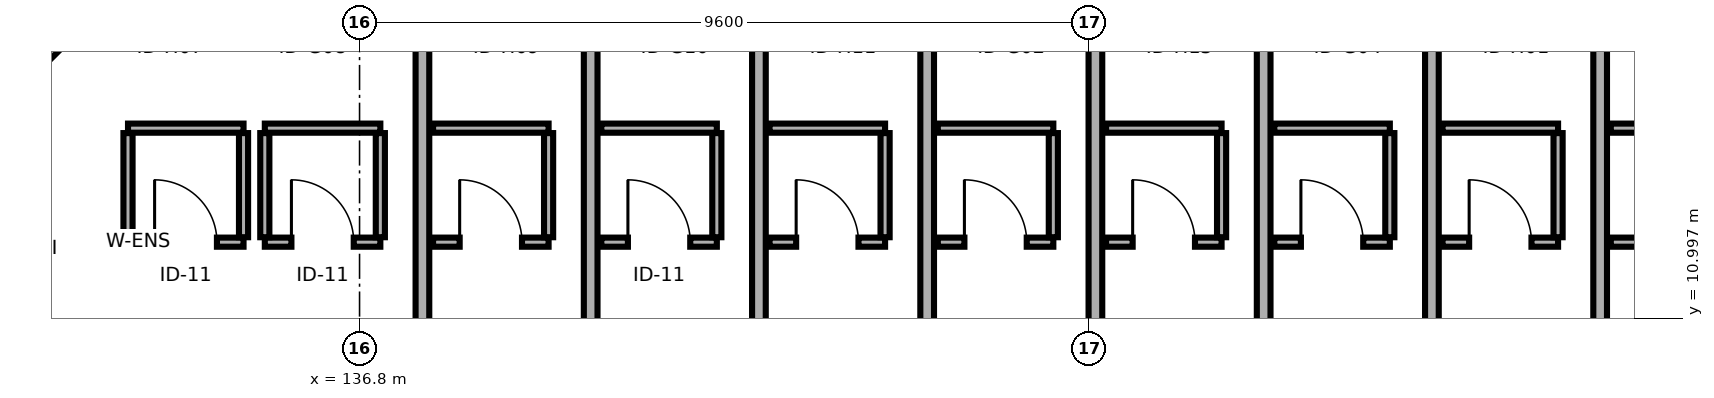
"""IFC4 building model, lengths in metres.
Left out: names, types, materials, properties, quantities, classifications, styles, units other than length and angle.
Written with IfcOpenShell. Run it as: python <this file> out.ifc"""

import sys

from ifc_helpers import new_model, si_unit, direction, frame, frame_2d, origin, place, context, subcontext, project, spatial, rectangle, extrude, element, fill, save


model = new_model("IFC4")
c1 = context("Model", 3, precision=1e-05, world=origin(), true_north=direction((0.0, 1.0)))
c2 = subcontext(c1, "Body", "Model", "MODEL_VIEW")
j1 = project(units=[si_unit("LENGTHUNIT", "METRE"), si_unit("PLANEANGLEUNIT", "RADIAN")], contexts=[c1])
p1 = place(None, origin())
s1 = spatial("IfcSite", under=j1, at=p1, CompositionType="ELEMENT")
p2 = place(p1, origin())
s2 = spatial("IfcBuilding", under=s1, at=p2, CompositionType="ELEMENT")
p3 = place(p2, frame((0.0, 0.0, 18.1)))
s3 = spatial("IfcBuildingStorey", under=s2, at=p3, CompositionType="ELEMENT", Elevation=18.1)
p4 = place(p3, frame((133.754, 12.0, 0.0), z_axis=(0.0, 0.0, 1.0), x_axis=(1.0, 0.0, 0.0)))
e1 = element("IfcWall", 1, at=p4, inside=s3, PredefinedType="PARTITIONING", context=c2, shape_type="SweptSolid", body=[
    extrude(rectangle(XDim=1.52, YDim=0.12, at=frame_2d((0.76, 0.0))), origin(), (0.0, 0.0, 1.0), 2.745),
])
p5 = place(p4, frame((0.35, 0.0, 0.0)))
e2 = element("IfcOpeningElement", 2, at=p5, cuts=e1, PredefinedType="OPENING", context=c2, shape_type="SweptSolid", body=[
    extrude(rectangle(XDim=0.82, YDim=2.08, at=frame_2d((0.41, 1.04))), frame((0.0, 0.07, 0.0), z_axis=(0.0, -1.0, 0.0), x_axis=(1.0, 0.0, 0.0)), (0.0, 0.0, 1.0), 0.14),
])
p6 = place(p3, frame((133.754, 13.5, 0.0), z_axis=(0.0, 0.0, 1.0), x_axis=(1.0, 0.0, 0.0)))
e3 = element("IfcWall", 3, at=p6, inside=s3, PredefinedType="PARTITIONING", context=c2, shape_type="SweptSolid", body=[
    extrude(rectangle(XDim=1.52, YDim=0.12, at=frame_2d((0.76, 0.0))), origin(), (0.0, 0.0, 1.0), 3.21),
])
p7 = place(p3, frame((133.754, 12.065, 0.0), z_axis=(0.0, 0.0, 1.0), x_axis=(0.0, 1.0, 0.0)))
e4 = element("IfcWall", 4, at=p7, inside=s3, PredefinedType="PARTITIONING", context=c2, shape_type="SweptSolid", body=[
    extrude(rectangle(XDim=1.37, YDim=0.12, at=frame_2d((0.685, 0.0))), origin(), (0.0, 0.0, 1.0), 3.21),
])
p8 = place(p3, frame((135.274, 12.065, 0.0), z_axis=(0.0, 0.0, 1.0), x_axis=(0.0, 1.0, 0.0)))
e5 = element("IfcWall", 5, at=p8, inside=s3, PredefinedType="PARTITIONING", context=c2, shape_type="SweptSolid", body=[
    extrude(rectangle(XDim=1.37, YDim=0.12, at=frame_2d((0.685, 0.0))), origin(), (0.0, 0.0, 1.0), 2.745),
])
p9 = place(p3, frame((133.2, 15.0, 0.0), z_axis=(0.0, 0.0, 1.0), x_axis=(-0.707106781187, -0.707106781187, 0.0)))
e6 = element("IfcWall", 6, at=p9, inside=s3, PredefinedType="PARTITIONING", context=c2, shape_type="SweptSolid", body=[
    extrude(rectangle(XDim=4.839, YDim=0.18, at=frame_2d((2.419, 0.0))), origin(), (0.0, 0.0, 1.0), 2.755),
])
p10 = place(p3, frame((135.554, 12.0, 0.0), z_axis=(0.0, 0.0, 1.0), x_axis=(1.0, 0.0, 0.0)))
e7 = element("IfcWall", 7, at=p10, inside=s3, PredefinedType="PARTITIONING", context=c2, shape_type="SweptSolid", body=[
    extrude(rectangle(XDim=1.52, YDim=0.12, at=frame_2d((0.76, 0.0))), origin(), (0.0, 0.0, 1.0), 3.21),
])
p11 = place(p10, frame((0.35, 0.0, 0.0)))
e8 = element("IfcOpeningElement", 8, at=p11, cuts=e7, PredefinedType="OPENING", context=c2, shape_type="SweptSolid", body=[
    extrude(rectangle(XDim=0.82, YDim=2.08, at=frame_2d((0.41, 1.04))), frame((0.0, 0.07, 0.0), z_axis=(0.0, -1.0, 0.0), x_axis=(1.0, 0.0, 0.0)), (0.0, 0.0, 1.0), 0.14),
])
p12 = place(p3, frame((135.554, 13.5, 0.0), z_axis=(0.0, 0.0, 1.0), x_axis=(1.0, 0.0, 0.0)))
e9 = element("IfcWall", 9, at=p12, inside=s3, PredefinedType="PARTITIONING", context=c2, shape_type="SweptSolid", body=[
    extrude(rectangle(XDim=1.52, YDim=0.12, at=frame_2d((0.76, 0.0))), origin(), (0.0, 0.0, 1.0), 2.745),
])
p13 = place(p3, frame((135.554, 12.065, 0.0), z_axis=(0.0, 0.0, 1.0), x_axis=(0.0, 1.0, 0.0)))
e10 = element("IfcWall", 10, at=p13, inside=s3, PredefinedType="PARTITIONING", context=c2, shape_type="SweptSolid", body=[
    extrude(rectangle(XDim=1.37, YDim=0.12, at=frame_2d((0.685, 0.0))), origin(), (0.0, 0.0, 1.0), 2.745),
])
p14 = place(p3, frame((137.073, 12.065, 0.0), z_axis=(0.0, 0.0, 1.0), x_axis=(0.0, 1.0, 0.0)))
e11 = element("IfcWall", 11, at=p14, inside=s3, PredefinedType="PARTITIONING", context=c2, shape_type="SweptSolid", body=[
    extrude(rectangle(XDim=1.37, YDim=0.12, at=frame_2d((0.685, 0.0))), origin(), (0.0, 0.0, 1.0), 3.21),
])
p15 = place(p3, frame((137.627, 7.246, 0.0), z_axis=(0.0, 0.0, 1.0), x_axis=(0.0, 1.0, 0.0)))
e12 = element("IfcWall", 12, at=p15, inside=s3, PredefinedType="PARTITIONING", context=c2, shape_type="SweptSolid", body=[
    extrude(rectangle(XDim=7.754, YDim=0.18, at=frame_2d((3.877, 0.0))), origin(), (0.0, 0.0, 1.0), 2.755),
])
p16 = place(p3, frame((137.767, 12.0, 0.0), z_axis=(0.0, 0.0, 1.0), x_axis=(1.0, 0.0, 0.0)))
e13 = element("IfcWall", 13, at=p16, inside=s3, PredefinedType="PARTITIONING", context=c2, shape_type="SweptSolid", body=[
    extrude(rectangle(XDim=1.52, YDim=0.12, at=frame_2d((0.76, 0.0))), origin(), (0.0, 0.0, 1.0), 3.21),
])
p17 = place(p16, frame((0.35, 0.0, 0.0)))
e14 = element("IfcOpeningElement", 14, at=p17, cuts=e13, PredefinedType="OPENING", context=c2, shape_type="SweptSolid", body=[
    extrude(rectangle(XDim=0.82, YDim=2.08, at=frame_2d((0.41, 1.04))), frame((0.0, 0.07, 0.0), z_axis=(0.0, -1.0, 0.0), x_axis=(1.0, 0.0, 0.0)), (0.0, 0.0, 1.0), 0.14),
])
p18 = place(p3, frame((137.767, 13.5, 0.0), z_axis=(0.0, 0.0, 1.0), x_axis=(1.0, 0.0, 0.0)))
e15 = element("IfcWall", 15, at=p18, inside=s3, PredefinedType="PARTITIONING", context=c2, shape_type="SweptSolid", body=[
    extrude(rectangle(XDim=1.52, YDim=0.12, at=frame_2d((0.76, 0.0))), origin(), (0.0, 0.0, 1.0), 3.21),
])
p19 = place(p3, frame((139.287, 12.065, 0.0), z_axis=(0.0, 0.0, 1.0), x_axis=(0.0, 1.0, 0.0)))
e16 = element("IfcWall", 16, at=p19, inside=s3, PredefinedType="PARTITIONING", context=c2, shape_type="SweptSolid", body=[
    extrude(rectangle(XDim=1.37, YDim=0.12, at=frame_2d((0.685, 0.0))), origin(), (0.0, 0.0, 1.0), 3.21),
])
p20 = place(p3, frame((139.841, 6.823, 0.0), z_axis=(0.0, 0.0, 1.0), x_axis=(0.0, 1.0, 0.0)))
e17 = element("IfcWall", 17, at=p20, inside=s3, PredefinedType="PARTITIONING", context=c2, shape_type="SweptSolid", body=[
    extrude(rectangle(XDim=8.177, YDim=0.18, at=frame_2d((4.089, 0.0))), origin(), (0.0, 0.0, 1.0), 2.755),
])
p21 = place(p3, frame((139.981, 12.0, 0.0), z_axis=(0.0, 0.0, 1.0), x_axis=(1.0, 0.0, 0.0)))
e18 = element("IfcWall", 18, at=p21, inside=s3, PredefinedType="PARTITIONING", context=c2, shape_type="SweptSolid", body=[
    extrude(rectangle(XDim=1.52, YDim=0.12, at=frame_2d((0.76, 0.0))), origin(), (0.0, 0.0, 1.0), 2.745),
])
p22 = place(p21, frame((0.35, 0.0, 0.0)))
e19 = element("IfcOpeningElement", 19, at=p22, cuts=e18, PredefinedType="OPENING", context=c2, shape_type="SweptSolid", body=[
    extrude(rectangle(XDim=0.82, YDim=2.08, at=frame_2d((0.41, 1.04))), frame((0.0, 0.07, 0.0), z_axis=(0.0, -1.0, 0.0), x_axis=(1.0, 0.0, 0.0)), (0.0, 0.0, 1.0), 0.14),
])
p23 = place(p3, frame((139.981, 13.5, 0.0), z_axis=(0.0, 0.0, 1.0), x_axis=(1.0, 0.0, 0.0)))
e20 = element("IfcWall", 20, at=p23, inside=s3, PredefinedType="PARTITIONING", context=c2, shape_type="SweptSolid", body=[
    extrude(rectangle(XDim=1.52, YDim=0.12, at=frame_2d((0.76, 0.0))), origin(), (0.0, 0.0, 1.0), 2.745),
])
p24 = place(p3, frame((141.501, 12.065, 0.0), z_axis=(0.0, 0.0, 1.0), x_axis=(0.0, 1.0, 0.0)))
e21 = element("IfcWall", 21, at=p24, inside=s3, PredefinedType="PARTITIONING", context=c2, shape_type="SweptSolid", body=[
    extrude(rectangle(XDim=1.37, YDim=0.12, at=frame_2d((0.685, 0.0))), origin(), (0.0, 0.0, 1.0), 2.745),
])
p25 = place(p3, frame((142.054, 6.605, 0.0), z_axis=(0.0, 0.0, 1.0), x_axis=(0.0, 1.0, 0.0)))
e22 = element("IfcWall", 22, at=p25, inside=s3, PredefinedType="PARTITIONING", context=c2, shape_type="SweptSolid", body=[
    extrude(rectangle(XDim=8.395, YDim=0.18, at=frame_2d((4.198, 0.0))), origin(), (0.0, 0.0, 1.0), 2.755),
])
p26 = place(p3, frame((142.195, 12.0, 0.0), z_axis=(0.0, 0.0, 1.0), x_axis=(1.0, 0.0, 0.0)))
e23 = element("IfcWall", 23, at=p26, inside=s3, PredefinedType="PARTITIONING", context=c2, shape_type="SweptSolid", body=[
    extrude(rectangle(XDim=1.52, YDim=0.12, at=frame_2d((0.76, 0.0))), origin(), (0.0, 0.0, 1.0), 3.21),
])
p27 = place(p26, frame((0.35, 0.0, 0.0)))
e24 = element("IfcOpeningElement", 24, at=p27, cuts=e23, PredefinedType="OPENING", context=c2, shape_type="SweptSolid", body=[
    extrude(rectangle(XDim=0.82, YDim=2.08, at=frame_2d((0.41, 1.04))), frame((0.0, 0.07, 0.0), z_axis=(0.0, -1.0, 0.0), x_axis=(1.0, 0.0, 0.0)), (0.0, 0.0, 1.0), 0.14),
])
p28 = place(p3, frame((142.195, 13.5, 0.0), z_axis=(0.0, 0.0, 1.0), x_axis=(1.0, 0.0, 0.0)))
e25 = element("IfcWall", 25, at=p28, inside=s3, PredefinedType="PARTITIONING", context=c2, shape_type="SweptSolid", body=[
    extrude(rectangle(XDim=1.52, YDim=0.12, at=frame_2d((0.76, 0.0))), origin(), (0.0, 0.0, 1.0), 3.21),
])
p29 = place(p3, frame((143.715, 12.065, 0.0), z_axis=(0.0, 0.0, 1.0), x_axis=(0.0, 1.0, 0.0)))
e26 = element("IfcWall", 26, at=p29, inside=s3, PredefinedType="PARTITIONING", context=c2, shape_type="SweptSolid", body=[
    extrude(rectangle(XDim=1.37, YDim=0.12, at=frame_2d((0.685, 0.0))), origin(), (0.0, 0.0, 1.0), 3.21),
])
p30 = place(p3, frame((144.268, 6.597, 0.0), z_axis=(0.0, 0.0, 1.0), x_axis=(0.0, 1.0, 0.0)))
e27 = element("IfcWall", 27, at=p30, inside=s3, PredefinedType="PARTITIONING", context=c2, shape_type="SweptSolid", body=[
    extrude(rectangle(XDim=8.403, YDim=0.18, at=frame_2d((4.201, 0.0))), origin(), (0.0, 0.0, 1.0), 2.755),
])
p31 = place(p3, frame((144.408, 12.0, 0.0), z_axis=(0.0, 0.0, 1.0), x_axis=(1.0, 0.0, 0.0)))
e28 = element("IfcWall", 28, at=p31, inside=s3, PredefinedType="PARTITIONING", context=c2, shape_type="SweptSolid", body=[
    extrude(rectangle(XDim=1.52, YDim=0.12, at=frame_2d((0.76, 0.0))), origin(), (0.0, 0.0, 1.0), 3.21),
])
p32 = place(p31, frame((0.35, 0.0, 0.0)))
e29 = element("IfcOpeningElement", 29, at=p32, cuts=e28, PredefinedType="OPENING", context=c2, shape_type="SweptSolid", body=[
    extrude(rectangle(XDim=0.82, YDim=2.08, at=frame_2d((0.41, 1.04))), frame((0.0, 0.07, 0.0), z_axis=(0.0, -1.0, 0.0), x_axis=(1.0, 0.0, 0.0)), (0.0, 0.0, 1.0), 0.14),
])
p33 = place(p3, frame((144.408, 13.5, 0.0), z_axis=(0.0, 0.0, 1.0), x_axis=(1.0, 0.0, 0.0)))
e30 = element("IfcWall", 30, at=p33, inside=s3, PredefinedType="PARTITIONING", context=c2, shape_type="SweptSolid", body=[
    extrude(rectangle(XDim=1.52, YDim=0.12, at=frame_2d((0.76, 0.0))), origin(), (0.0, 0.0, 1.0), 3.21),
])
p34 = place(p3, frame((145.928, 12.065, 0.0), z_axis=(0.0, 0.0, 1.0), x_axis=(0.0, 1.0, 0.0)))
e31 = element("IfcWall", 31, at=p34, inside=s3, PredefinedType="PARTITIONING", context=c2, shape_type="SweptSolid", body=[
    extrude(rectangle(XDim=1.37, YDim=0.12, at=frame_2d((0.685, 0.0))), origin(), (0.0, 0.0, 1.0), 3.21),
])
p35 = place(p3, frame((146.482, 6.597, 0.0), z_axis=(0.0, 0.0, 1.0), x_axis=(0.0, 1.0, 0.0)))
e32 = element("IfcWall", 32, at=p35, inside=s3, PredefinedType="PARTITIONING", context=c2, shape_type="SweptSolid", body=[
    extrude(rectangle(XDim=8.403, YDim=0.18, at=frame_2d((4.201, 0.0))), origin(), (0.0, 0.0, 1.0), 2.755),
])
p36 = place(p3, frame((146.622, 12.0, 0.0), z_axis=(0.0, 0.0, 1.0), x_axis=(1.0, 0.0, 0.0)))
e33 = element("IfcWall", 33, at=p36, inside=s3, PredefinedType="PARTITIONING", context=c2, shape_type="SweptSolid", body=[
    extrude(rectangle(XDim=1.52, YDim=0.12, at=frame_2d((0.76, 0.0))), origin(), (0.0, 0.0, 1.0), 3.21),
])
p37 = place(p36, frame((0.35, 0.0, 0.0)))
e34 = element("IfcOpeningElement", 34, at=p37, cuts=e33, PredefinedType="OPENING", context=c2, shape_type="SweptSolid", body=[
    extrude(rectangle(XDim=0.82, YDim=2.08, at=frame_2d((0.41, 1.04))), frame((0.0, 0.07, 0.0), z_axis=(0.0, -1.0, 0.0), x_axis=(1.0, 0.0, 0.0)), (0.0, 0.0, 1.0), 0.14),
])
p38 = place(p3, frame((146.622, 13.5, 0.0), z_axis=(0.0, 0.0, 1.0), x_axis=(1.0, 0.0, 0.0)))
e35 = element("IfcWall", 35, at=p38, inside=s3, PredefinedType="PARTITIONING", context=c2, shape_type="SweptSolid", body=[
    extrude(rectangle(XDim=1.52, YDim=0.12, at=frame_2d((0.76, 0.0))), origin(), (0.0, 0.0, 1.0), 3.21),
])
p39 = place(p3, frame((148.142, 12.065, 0.0), z_axis=(0.0, 0.0, 1.0), x_axis=(0.0, 1.0, 0.0)))
e36 = element("IfcWall", 36, at=p39, inside=s3, PredefinedType="PARTITIONING", context=c2, shape_type="SweptSolid", body=[
    extrude(rectangle(XDim=1.37, YDim=0.12, at=frame_2d((0.685, 0.0))), origin(), (0.0, 0.0, 1.0), 3.21),
])
p40 = place(p3, frame((148.696, 6.639, 0.0), z_axis=(0.0, 0.0, 1.0), x_axis=(0.0, 1.0, 0.0)))
e37 = element("IfcWall", 37, at=p40, inside=s3, PredefinedType="PARTITIONING", context=c2, shape_type="SweptSolid", body=[
    extrude(rectangle(XDim=8.361, YDim=0.18, at=frame_2d((4.18, 0.0))), origin(), (0.0, 0.0, 1.0), 2.755),
])
p41 = place(p3, frame((148.835, 12.0, 0.0), z_axis=(0.0, 0.0, 1.0), x_axis=(1.0, 0.0, 0.0)))
e38 = element("IfcWall", 38, at=p41, inside=s3, PredefinedType="PARTITIONING", context=c2, shape_type="SweptSolid", body=[
    extrude(rectangle(XDim=1.52, YDim=0.12, at=frame_2d((0.76, 0.0))), origin(), (0.0, 0.0, 1.0), 2.745),
])
p42 = place(p41, frame((0.35, 0.0, 0.0)))
e39 = element("IfcOpeningElement", 39, at=p42, cuts=e38, PredefinedType="OPENING", context=c2, shape_type="SweptSolid", body=[
    extrude(rectangle(XDim=0.82, YDim=2.08, at=frame_2d((0.41, 1.04))), frame((0.0, 0.07, 0.0), z_axis=(0.0, -1.0, 0.0), x_axis=(1.0, 0.0, 0.0)), (0.0, 0.0, 1.0), 0.14),
])
p43 = place(p3, frame((148.835, 13.5, 0.0), z_axis=(0.0, 0.0, 1.0), x_axis=(1.0, 0.0, 0.0)))
e40 = element("IfcWall", 40, at=p43, inside=s3, PredefinedType="PARTITIONING", context=c2, shape_type="SweptSolid", body=[
    extrude(rectangle(XDim=1.52, YDim=0.12, at=frame_2d((0.76, 0.0))), origin(), (0.0, 0.0, 1.0), 2.745),
])
p44 = place(p3, frame((150.355, 12.065, 0.0), z_axis=(0.0, 0.0, 1.0), x_axis=(0.0, 1.0, 0.0)))
e41 = element("IfcWall", 41, at=p44, inside=s3, PredefinedType="PARTITIONING", context=c2, shape_type="SweptSolid", body=[
    extrude(rectangle(XDim=1.37, YDim=0.12, at=frame_2d((0.685, 0.0))), origin(), (0.0, 0.0, 1.0), 3.21),
])
p45 = place(p3, frame((150.909, 6.857, 0.0), z_axis=(0.0, 0.0, 1.0), x_axis=(0.0, 1.0, 0.0)))
e42 = element("IfcWall", 42, at=p45, inside=s3, PredefinedType="PARTITIONING", context=c2, shape_type="SweptSolid", body=[
    extrude(rectangle(XDim=8.143, YDim=0.18, at=frame_2d((4.071, 0.0))), origin(), (0.0, 0.0, 1.0), 2.755),
])
p46 = place(p3, frame((151.049, 12.0, 0.0), z_axis=(0.0, 0.0, 1.0), x_axis=(1.0, 0.0, 0.0)))
e43 = element("IfcWall", 43, at=p46, inside=s3, PredefinedType="PARTITIONING", context=c2, shape_type="SweptSolid", body=[
    extrude(rectangle(XDim=1.52, YDim=0.12, at=frame_2d((0.76, 0.0))), origin(), (0.0, 0.0, 1.0), 3.21),
])
p47 = place(p46, frame((0.35, 0.0, 0.0)))
e44 = element("IfcOpeningElement", 44, at=p47, cuts=e43, PredefinedType="OPENING", context=c2, shape_type="SweptSolid", body=[
    extrude(rectangle(XDim=0.82, YDim=2.08, at=frame_2d((0.41, 1.04))), frame((0.0, 0.07, 0.0), z_axis=(0.0, -1.0, 0.0), x_axis=(1.0, 0.0, 0.0)), (0.0, 0.0, 1.0), 0.14),
])
p48 = place(p3, frame((151.049, 13.5, 0.0), z_axis=(0.0, 0.0, 1.0), x_axis=(1.0, 0.0, 0.0)))
e45 = element("IfcWall", 45, at=p48, inside=s3, PredefinedType="PARTITIONING", context=c2, shape_type="SweptSolid", body=[
    extrude(rectangle(XDim=1.52, YDim=0.12, at=frame_2d((0.76, 0.0))), origin(), (0.0, 0.0, 1.0), 3.21),
])
p49 = place(p3, frame((152.569, 12.065, 0.0), z_axis=(0.0, 0.0, 1.0), x_axis=(0.0, 1.0, 0.0)))
e46 = element("IfcWall", 46, at=p49, inside=s3, PredefinedType="PARTITIONING", context=c2, shape_type="SweptSolid", body=[
    extrude(rectangle(XDim=1.37, YDim=0.12, at=frame_2d((0.685, 0.0))), origin(), (0.0, 0.0, 1.0), 3.21),
])
p50 = place(p3, frame((153.123, 7.352, 0.0), z_axis=(0.0, 0.0, 1.0), x_axis=(0.0, 1.0, 0.0)))
e47 = element("IfcWall", 47, at=p50, inside=s3, PredefinedType="PARTITIONING", context=c2, shape_type="SweptSolid", body=[
    extrude(rectangle(XDim=7.648, YDim=0.18, at=frame_2d((3.824, 0.0))), origin(), (0.0, 0.0, 1.0), 2.755),
])
p51 = place(p3, frame((153.263, 12.0, 0.0), z_axis=(0.0, 0.0, 1.0), x_axis=(1.0, 0.0, 0.0)))
e48 = element("IfcWall", 48, at=p51, inside=s3, PredefinedType="PARTITIONING", context=c2, shape_type="SweptSolid", body=[
    extrude(rectangle(XDim=1.52, YDim=0.12, at=frame_2d((0.76, 0.0))), origin(), (0.0, 0.0, 1.0), 3.21),
])
p52 = place(p51, frame((0.35, 0.0, 0.0)))
e49 = element("IfcOpeningElement", 49, at=p52, cuts=e48, PredefinedType="OPENING", context=c2, shape_type="SweptSolid", body=[
    extrude(rectangle(XDim=0.82, YDim=2.08, at=frame_2d((0.41, 1.04))), frame((0.0, 0.07, 0.0), z_axis=(0.0, -1.0, 0.0), x_axis=(1.0, 0.0, 0.0)), (0.0, 0.0, 1.0), 0.14),
])
p53 = place(p3, frame((153.263, 13.5, 0.0), z_axis=(0.0, 0.0, 1.0), x_axis=(1.0, 0.0, 0.0)))
e50 = element("IfcWall", 50, at=p53, inside=s3, PredefinedType="PARTITIONING", context=c2, shape_type="SweptSolid", body=[
    extrude(rectangle(XDim=1.52, YDim=0.12, at=frame_2d((0.76, 0.0))), origin(), (0.0, 0.0, 1.0), 3.21),
])
p54 = place(p5, origin())
e51 = element("IfcDoor", 51, at=p54, inside=s3, OperationType="SINGLE_SWING_LEFT", PredefinedType="DOOR", context=c2, shape_type="SweptSolid", body=[
    extrude(rectangle(XDim=0.82, YDim=2.08, at=frame_2d((0.41, 1.04))), frame((0.0, 0.025, 0.0), z_axis=(0.0, -1.0, 0.0), x_axis=(1.0, 0.0, 0.0)), (0.0, 0.0, 1.0), 0.05),
])
fill(e2, e51)
p55 = place(p11, origin())
e52 = element("IfcDoor", 52, at=p55, inside=s3, OperationType="SINGLE_SWING_LEFT", PredefinedType="DOOR", context=c2, shape_type="SweptSolid", body=[
    extrude(rectangle(XDim=0.82, YDim=2.08, at=frame_2d((0.41, 1.04))), frame((0.0, 0.025, 0.0), z_axis=(0.0, -1.0, 0.0), x_axis=(1.0, 0.0, 0.0)), (0.0, 0.0, 1.0), 0.05),
])
fill(e8, e52)
p56 = place(p17, origin())
e53 = element("IfcDoor", 53, at=p56, inside=s3, OperationType="SINGLE_SWING_LEFT", PredefinedType="DOOR", context=c2, shape_type="SweptSolid", body=[
    extrude(rectangle(XDim=0.82, YDim=2.08, at=frame_2d((0.41, 1.04))), frame((0.0, 0.025, 0.0), z_axis=(0.0, -1.0, 0.0), x_axis=(1.0, 0.0, 0.0)), (0.0, 0.0, 1.0), 0.05),
])
fill(e14, e53)
p57 = place(p22, origin())
e54 = element("IfcDoor", 54, at=p57, inside=s3, OperationType="SINGLE_SWING_LEFT", PredefinedType="DOOR", context=c2, shape_type="SweptSolid", body=[
    extrude(rectangle(XDim=0.82, YDim=2.08, at=frame_2d((0.41, 1.04))), frame((0.0, 0.025, 0.0), z_axis=(0.0, -1.0, 0.0), x_axis=(1.0, 0.0, 0.0)), (0.0, 0.0, 1.0), 0.05),
])
fill(e19, e54)
p58 = place(p27, origin())
e55 = element("IfcDoor", 55, at=p58, inside=s3, OperationType="SINGLE_SWING_LEFT", PredefinedType="DOOR", context=c2, shape_type="SweptSolid", body=[
    extrude(rectangle(XDim=0.82, YDim=2.08, at=frame_2d((0.41, 1.04))), frame((0.0, 0.025, 0.0), z_axis=(0.0, -1.0, 0.0), x_axis=(1.0, 0.0, 0.0)), (0.0, 0.0, 1.0), 0.05),
])
fill(e24, e55)
p59 = place(p32, origin())
e56 = element("IfcDoor", 56, at=p59, inside=s3, OperationType="SINGLE_SWING_LEFT", PredefinedType="DOOR", context=c2, shape_type="SweptSolid", body=[
    extrude(rectangle(XDim=0.82, YDim=2.08, at=frame_2d((0.41, 1.04))), frame((0.0, 0.025, 0.0), z_axis=(0.0, -1.0, 0.0), x_axis=(1.0, 0.0, 0.0)), (0.0, 0.0, 1.0), 0.05),
])
fill(e29, e56)
p60 = place(p37, origin())
e57 = element("IfcDoor", 57, at=p60, inside=s3, OperationType="SINGLE_SWING_LEFT", PredefinedType="DOOR", context=c2, shape_type="SweptSolid", body=[
    extrude(rectangle(XDim=0.82, YDim=2.08, at=frame_2d((0.41, 1.04))), frame((0.0, 0.025, 0.0), z_axis=(0.0, -1.0, 0.0), x_axis=(1.0, 0.0, 0.0)), (0.0, 0.0, 1.0), 0.05),
])
fill(e34, e57)
p61 = place(p42, origin())
e58 = element("IfcDoor", 58, at=p61, inside=s3, OperationType="SINGLE_SWING_LEFT", PredefinedType="DOOR", context=c2, shape_type="SweptSolid", body=[
    extrude(rectangle(XDim=0.82, YDim=2.08, at=frame_2d((0.41, 1.04))), frame((0.0, 0.025, 0.0), z_axis=(0.0, -1.0, 0.0), x_axis=(1.0, 0.0, 0.0)), (0.0, 0.0, 1.0), 0.05),
])
fill(e39, e58)
p62 = place(p47, origin())
e59 = element("IfcDoor", 59, at=p62, inside=s3, OperationType="SINGLE_SWING_LEFT", PredefinedType="DOOR", context=c2, shape_type="SweptSolid", body=[
    extrude(rectangle(XDim=0.82, YDim=2.08, at=frame_2d((0.41, 1.04))), frame((0.0, 0.025, 0.0), z_axis=(0.0, -1.0, 0.0), x_axis=(1.0, 0.0, 0.0)), (0.0, 0.0, 1.0), 0.05),
])
fill(e44, e59)
save(model, sys.argv[1])
